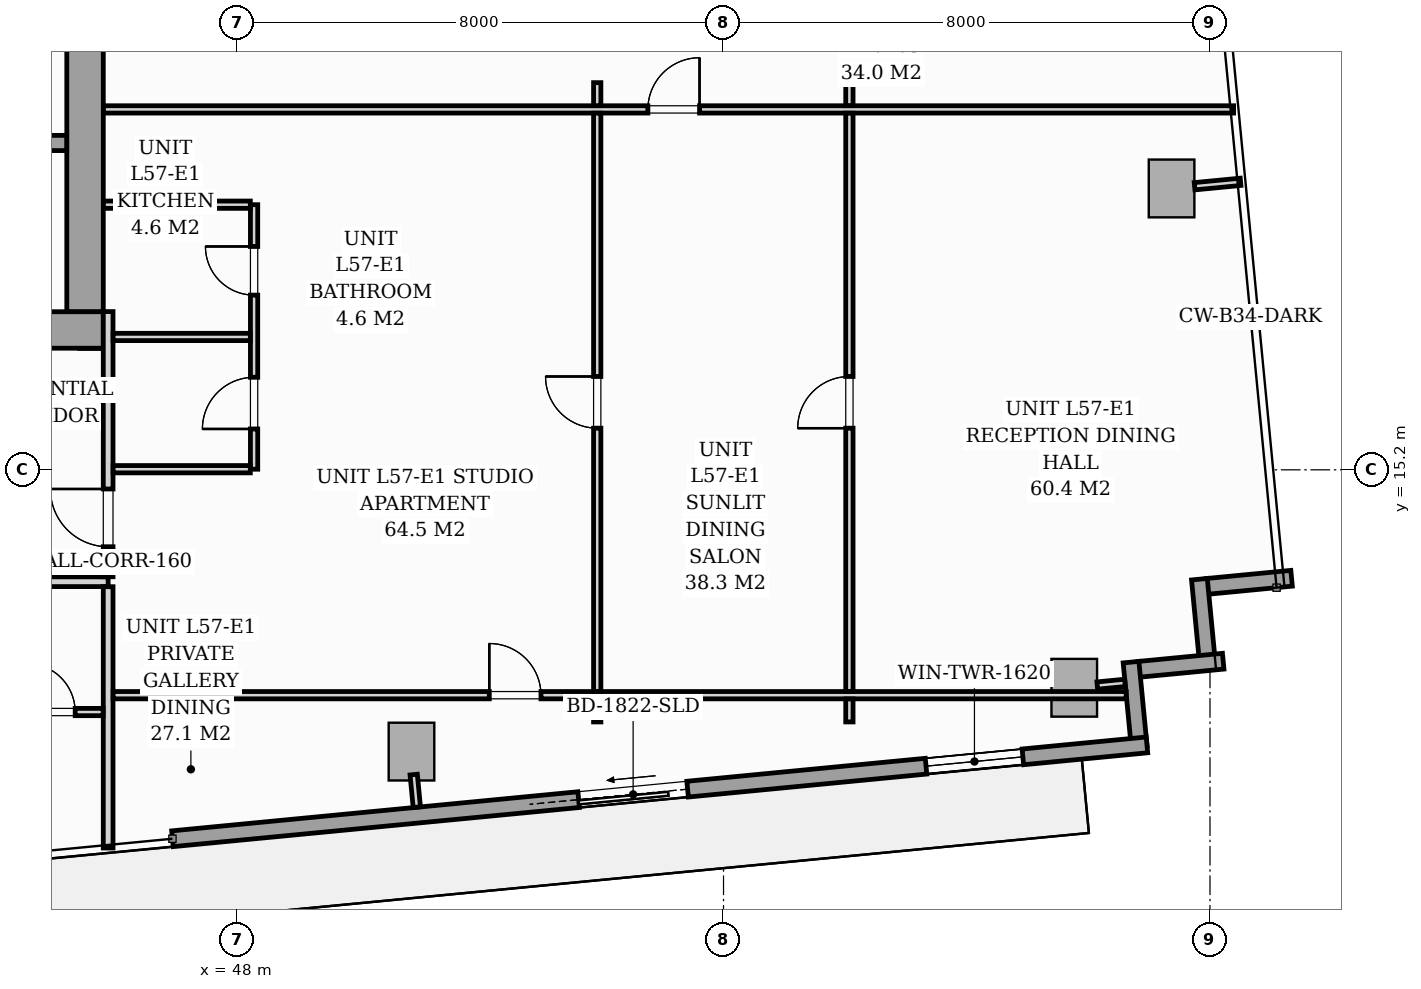
"""IFC4 building model, lengths in metres.
Left out: names, types, materials, properties, quantities, classifications, styles, units other than length and angle.
Written with IfcOpenShell. Run it as: python <this file> out.ifc"""

import sys

from ifc_helpers import new_model, si_unit, direction, frame, frame_2d, origin, origin_2d, place, context, subcontext, project, spatial, rectangle, i_section, extrude, source, transform, mapped, element, fill, save


model = new_model("IFC4")
c1 = context("Model", 3, precision=1e-05, world=origin(), true_north=direction((0.0, 1.0)))
c2 = subcontext(c1, "Body", "Model", "MODEL_VIEW")
j1 = project(units=[si_unit("LENGTHUNIT", "METRE"), si_unit("PLANEANGLEUNIT", "RADIAN")], contexts=[c1])
p1 = place(None, origin())
s1 = spatial("IfcSite", under=j1, at=p1, CompositionType="ELEMENT")
p2 = place(p1, origin())
s2 = spatial("IfcBuilding", under=s1, at=p2, CompositionType="ELEMENT")
p3 = place(p2, frame((0.0, 0.0, 198.6)))
s3 = spatial("IfcBuildingStorey", under=s2, at=p3, CompositionType="ELEMENT", Elevation=198.6)
m1 = source(origin(), c2, "Body", "SweptSolid", [
    extrude(i_section(OverallWidth=0.416, OverallDepth=0.446, WebThickness=0.039, FlangeThickness=0.063, FilletRadius=0.018, at=origin_2d()), origin(), (0.0, 0.0, 1.0), 3.196),
])
p4 = place(p3, frame((45.6, 17.4, 0.002), z_axis=(0.0, 0.0, 1.0), x_axis=(1.0, 0.0, 0.0)))
e1 = element("IfcColumn", 1, at=p4, inside=s3, PredefinedType="PILASTER", context=c2, shape_type="MappedRepresentation", body=[
    mapped(m1, transform((0.0, 0.0, 0.0), scale=1.0)),
])
m2 = source(origin(), c2, "Body", "SweptSolid", [
    extrude(rectangle(XDim=0.75, YDim=0.95, at=origin_2d()), origin(), (0.0, 0.0, 1.0), 3.196),
])
for number, where, z_axis, x_axis in (
    (2, (50.868, 10.566, 0.002), (0.0, 0.0, 1.0), (0.995, 0.096, 0.0)),
    (3, (61.768, 11.616, 0.002), (0.0, 0.0, 1.0), (0.995, 0.096, 0.0)),
    (4, (63.368, 19.827, 0.002), (0.0, 0.0, 1.0), (0.995, 0.096, 0.0)),
):
    element("IfcColumn", number, at=place(p3, frame(where, z_axis=z_axis, x_axis=x_axis)), inside=s3, PredefinedType="COLUMN", context=c2, shape_type="MappedRepresentation", body=[
        mapped(m2, transform((0.0, 0.0, 0.0), scale=1.0)),
    ])
p5 = place(p3, frame((65.342, 13.417, 0.0), z_axis=(0.0, 0.0, 1.0), x_axis=(-0.99540774648, -0.095725744959, 0.0)))
e5 = element("IfcWall", 5, at=p5, inside=s3, PredefinedType="STANDARD", context=c2, shape_type="SweptSolid", body=[
    extrude(rectangle(XDim=1.395, YDim=0.26, at=frame_2d((0.698, 0.0))), origin(), (0.0, 0.0, 1.0), 2.94),
])
p6 = place(p3, frame((63.826, 13.401, 0.0), z_axis=(0.0, 0.0, 1.0), x_axis=(0.095915846097, -0.995389446633, 0.0)))
e6 = element("IfcWall", 6, at=p6, inside=s3, PredefinedType="STANDARD", context=c2, shape_type="SweptSolid", body=[
    extrude(rectangle(XDim=1.395, YDim=0.26, at=frame_2d((0.697, 0.0))), origin(), (0.0, 0.0, 1.0), 2.94),
])
for number, where, z_axis, x_axis in (
    (7, (64.217, 12.053, 0.0), (0.0, 0.0, 1.0), (-0.995, -0.096, 0.0)),
    (8, (62.702, 12.037, 0.0), (0.0, 0.0, 1.0), (0.096, -0.995, 0.0)),
):
    element("IfcWall", number, at=place(p3, frame(where, z_axis=z_axis, x_axis=x_axis)), inside=s3, PredefinedType="STANDARD", context=c2, shape_type="SweptSolid", body=[
        extrude(rectangle(XDim=1.395, YDim=0.26, at=frame_2d((0.698, 0.0))), origin(), (0.0, 0.0, 1.0), 2.94),
    ])
p7 = place(p3, frame((62.963, 10.676, 0.0), z_axis=(0.0, 0.0, 1.0), x_axis=(-0.995395627913, -0.095851676732, 0.0)))
e9 = element("IfcWall", 9, at=p7, inside=s3, PredefinedType="STANDARD", context=c2, shape_type="SweptSolid", body=[
    extrude(rectangle(XDim=16.1, YDim=0.26, at=frame_2d((8.05, 0.0))), origin(), (0.0, 0.0, 1.0), 2.94),
])
p8 = place(p7, frame((7.589, 0.0, 0.0)))
e10 = element("IfcOpeningElement", 10, at=p8, cuts=e9, PredefinedType="OPENING", context=c2, shape_type="SweptSolid", body=[
    extrude(rectangle(XDim=1.8, YDim=2.06, at=frame_2d((0.9, 1.03))), frame((0.0, 0.14, 0.0), z_axis=(0.0, -1.0, 0.0), x_axis=(1.0, 0.0, 0.0)), (0.0, 0.0, 1.0), 0.28),
])
p9 = place(p7, frame((2.05, 0.0, 0.65)))
e11 = element("IfcOpeningElement", 11, at=p9, cuts=e9, PredefinedType="OPENING", context=c2, shape_type="SweptSolid", body=[
    extrude(rectangle(XDim=1.6, YDim=1.5, at=frame_2d((0.8, 0.75))), frame((0.0, 0.14, 0.0), z_axis=(0.0, -1.0, 0.0), x_axis=(1.0, 0.0, 0.0)), (0.0, 0.0, 1.0), 0.28),
])
p10 = place(p3, frame((26.2, 17.5, 0.0), z_axis=(0.0, 0.0, 1.0), x_axis=(1.0, 0.0, 0.0)))
e12 = element("IfcWall", 12, at=p10, inside=s3, PredefinedType="SHEAR", context=c2, shape_type="SweptSolid", body=[
    extrude(rectangle(XDim=19.6, YDim=0.6, at=frame_2d((9.8, 0.0))), origin(), (0.0, 0.0, 1.0), 3.2),
])
p11 = place(p10, frame((0.95, 0.0, 0.0)))
e13 = element("IfcOpeningElement", 13, at=p11, cuts=e12, PredefinedType="OPENING", context=c2, shape_type="SweptSolid", body=[
    extrude(rectangle(XDim=0.95, YDim=2.06, at=frame_2d((0.475, 1.03))), frame((0.0, 0.31, 0.0), z_axis=(0.0, -1.0, 0.0), x_axis=(1.0, 0.0, 0.0)), (0.0, 0.0, 1.0), 0.62),
])
p12 = place(p10, frame((9.38, 0.0, 0.0)))
e14 = element("IfcOpeningElement", 14, at=p12, cuts=e12, PredefinedType="OPENING", context=c2, shape_type="SweptSolid", body=[
    extrude(rectangle(XDim=0.85, YDim=2.0, at=frame_2d((0.425, 1.0))), frame((0.0, 0.31, 0.0), z_axis=(0.0, -1.0, 0.0), x_axis=(1.0, 0.0, 0.0)), (0.0, 0.0, 1.0), 0.62),
])
p13 = place(p10, frame((17.55, 0.0, 0.0)))
e15 = element("IfcOpeningElement", 15, at=p13, cuts=e12, PredefinedType="OPENING", context=c2, shape_type="SweptSolid", body=[
    extrude(rectangle(XDim=0.95, YDim=2.06, at=frame_2d((0.475, 1.03))), frame((0.0, 0.31, 0.0), z_axis=(0.0, -1.0, 0.0), x_axis=(1.0, 0.0, 0.0)), (0.0, 0.0, 1.0), 0.62),
])
p14 = place(p3, frame((45.5, 17.802, 0.0), z_axis=(0.0, 0.0, 1.0), x_axis=(0.0, 1.0, 0.0)))
e16 = element("IfcWall", 16, at=p14, inside=s3, PredefinedType="SHEAR", context=c2, shape_type="SweptSolid", body=[
    extrude(rectangle(XDim=5.796, YDim=0.6, at=frame_2d((2.898, 0.0))), origin(), (0.0, 0.0, 1.0), 3.2),
])
p15 = place(p3, frame((37.05, 20.575, 0.0), z_axis=(0.0, 0.0, 1.0), x_axis=(1.0, 0.0, 0.0)))
e17 = element("IfcWall", 17, at=p15, inside=s3, PredefinedType="SOLIDWALL", context=c2, shape_type="SweptSolid", body=[
    extrude(rectangle(XDim=8.148, YDim=0.25, at=frame_2d((4.074, 0.0))), origin(), (0.0, 0.0, 1.0), 3.2),
])
p16 = place(p15, frame((6.6, 0.0, 0.0)))
e18 = element("IfcOpeningElement", 18, at=p16, cuts=e17, PredefinedType="OPENING", context=c2, shape_type="SweptSolid", body=[
    extrude(rectangle(XDim=0.95, YDim=2.06, at=frame_2d((0.475, 1.03))), frame((0.0, 0.135, 0.0), z_axis=(0.0, -1.0, 0.0), x_axis=(1.0, 0.0, 0.0)), (0.0, 0.0, 1.0), 0.27),
])
p17 = place(p3, frame((26.12, 13.36, 0.0), z_axis=(0.0, 0.0, 1.0), x_axis=(1.0, 0.0, 0.0)))
e19 = element("IfcWall", 19, at=p17, inside=s3, PredefinedType="PARTITIONING", context=c2, shape_type="SweptSolid", body=[
    extrude(rectangle(XDim=19.76, YDim=0.16, at=frame_2d((9.88, 0.0))), origin(), (0.0, 0.0, 1.0), 2.94),
])
p18 = place(p17, frame((5.221, 0.0, 0.0)))
e20 = element("IfcOpeningElement", 20, at=p18, cuts=e19, PredefinedType="OPENING", context=c2, shape_type="SweptSolid", body=[
    extrude(rectangle(XDim=0.95, YDim=2.06, at=frame_2d((0.475, 1.03))), frame((0.0, 0.09, 0.0), z_axis=(0.0, -1.0, 0.0), x_axis=(1.0, 0.0, 0.0)), (0.0, 0.0, 1.0), 0.18),
])
p19 = place(p17, frame((12.119, 0.0, 0.0)))
e21 = element("IfcOpeningElement", 21, at=p19, cuts=e19, PredefinedType="OPENING", context=c2, shape_type="SweptSolid", body=[
    extrude(rectangle(XDim=0.95, YDim=2.06, at=frame_2d((0.475, 1.03))), frame((0.0, 0.09, 0.0), z_axis=(0.0, -1.0, 0.0), x_axis=(1.0, 0.0, 0.0)), (0.0, 0.0, 1.0), 0.18),
])
p20 = place(p17, frame((14.492, 0.0, 0.0)))
e22 = element("IfcOpeningElement", 22, at=p20, cuts=e19, PredefinedType="OPENING", context=c2, shape_type="SweptSolid", body=[
    extrude(rectangle(XDim=0.95, YDim=2.06, at=frame_2d((0.475, 1.03))), frame((0.0, 0.09, 0.0), z_axis=(0.0, -1.0, 0.0), x_axis=(1.0, 0.0, 0.0)), (0.0, 0.0, 1.0), 0.18),
])
p21 = place(p3, frame((45.88, 8.981, 0.0), z_axis=(0.0, 0.0, 1.0), x_axis=(0.0, 1.0, 0.0)))
e23 = element("IfcWall", 23, at=p21, inside=s3, PredefinedType="PARTITIONING", context=c2, shape_type="SweptSolid", body=[
    extrude(rectangle(XDim=4.297, YDim=0.16, at=frame_2d((2.148, 0.0))), origin(), (0.0, 0.0, 1.0), 2.94),
])
p22 = place(p3, frame((45.88, 13.442, 0.0), z_axis=(0.0, 0.0, 1.0), x_axis=(0.0, 1.0, 0.0)))
e24 = element("IfcWall", 24, at=p22, inside=s3, PredefinedType="PARTITIONING", context=c2, shape_type="SweptSolid", body=[
    extrude(rectangle(XDim=4.36, YDim=0.16, at=frame_2d((2.18, 0.0))), origin(), (0.0, 0.0, 1.0), 2.94),
])
p23 = place(p22, frame((0.493, 0.0, 0.0)))
e25 = element("IfcOpeningElement", 25, at=p23, cuts=e24, PredefinedType="OPENING", context=c2, shape_type="SweptSolid", body=[
    extrude(rectangle(XDim=0.95, YDim=2.06, at=frame_2d((0.475, 1.03))), frame((0.0, 0.09, 0.0), z_axis=(0.0, -1.0, 0.0), x_axis=(1.0, 0.0, 0.0)), (0.0, 0.0, 1.0), 0.18),
])
p24 = place(p3, frame((42.122, 11.217, 0.0), z_axis=(0.0, 0.0, 1.0), x_axis=(1.0, 0.0, 0.0)))
e26 = element("IfcWall", 26, at=p24, inside=s3, PredefinedType="PARTITIONING", context=c2, shape_type="SweptSolid", body=[
    extrude(rectangle(XDim=3.676, YDim=0.12, at=frame_2d((1.838, 0.0))), origin(), (0.0, 0.0, 1.0), 2.94),
])
p25 = place(p24, frame((0.552, 0.0, 0.0)))
e27 = element("IfcOpeningElement", 27, at=p25, cuts=e26, PredefinedType="OPENING", context=c2, shape_type="SweptSolid", body=[
    extrude(rectangle(XDim=0.85, YDim=2.05, at=frame_2d((0.425, 1.025))), frame((0.0, 0.07, 0.0), z_axis=(0.0, -1.0, 0.0), x_axis=(1.0, 0.0, 0.0)), (0.0, 0.0, 1.0), 0.14),
])
p26 = place(p24, frame((2.416, 0.0, 0.0)))
e28 = element("IfcOpeningElement", 28, at=p26, cuts=e26, PredefinedType="OPENING", context=c2, shape_type="SweptSolid", body=[
    extrude(rectangle(XDim=0.8, YDim=2.02, at=frame_2d((0.4, 1.01))), frame((0.0, 0.07, 0.0), z_axis=(0.0, -1.0, 0.0), x_axis=(1.0, 0.0, 0.0)), (0.0, 0.0, 1.0), 0.14),
])
p27 = place(p3, frame((48.28, 15.21, 0.0), z_axis=(0.0, 0.0, 1.0), x_axis=(0.0, 1.0, 0.0)))
e29 = element("IfcWall", 29, at=p27, inside=s3, PredefinedType="PARTITIONING", context=c2, shape_type="SweptSolid", body=[
    extrude(rectangle(XDim=4.35, YDim=0.12, at=frame_2d((2.175, 0.0))), origin(), (0.0, 0.0, 1.0), 2.94),
])
p28 = place(p27, frame((0.662, 0.0, 0.0)))
e30 = element("IfcOpeningElement", 30, at=p28, cuts=e29, PredefinedType="OPENING", context=c2, shape_type="SweptSolid", body=[
    extrude(rectangle(XDim=0.85, YDim=2.05, at=frame_2d((0.425, 1.025))), frame((0.0, 0.07, 0.0), z_axis=(0.0, -1.0, 0.0), x_axis=(1.0, 0.0, 0.0)), (0.0, 0.0, 1.0), 0.14),
])
p29 = place(p27, frame((2.863, 0.0, 0.0)))
e31 = element("IfcOpeningElement", 31, at=p29, cuts=e29, PredefinedType="OPENING", context=c2, shape_type="SweptSolid", body=[
    extrude(rectangle(XDim=0.8, YDim=2.02, at=frame_2d((0.4, 1.01))), frame((0.0, 0.07, 0.0), z_axis=(0.0, -1.0, 0.0), x_axis=(1.0, 0.0, 0.0)), (0.0, 0.0, 1.0), 0.14),
])
p30 = place(p3, frame((45.962, 17.385, 0.0), z_axis=(0.0, 0.0, 1.0), x_axis=(1.0, 0.0, 0.0)))
e32 = element("IfcWall", 32, at=p30, inside=s3, PredefinedType="PARTITIONING", context=c2, shape_type="SweptSolid", body=[
    extrude(rectangle(XDim=2.256, YDim=0.12, at=frame_2d((1.128, 0.0))), origin(), (0.0, 0.0, 1.0), 2.281),
])
p31 = place(p3, frame((45.962, 15.21, 0.0), z_axis=(0.0, 0.0, 1.0), x_axis=(1.0, 0.0, 0.0)))
e33 = element("IfcWall", 33, at=p31, inside=s3, PredefinedType="PARTITIONING", context=c2, shape_type="SweptSolid", body=[
    extrude(rectangle(XDim=2.256, YDim=0.12, at=frame_2d((1.128, 0.0))), origin(), (0.0, 0.0, 1.0), 2.94),
])
p32 = place(p3, frame((45.802, 19.56, 0.0), z_axis=(0.0, 0.0, 1.0), x_axis=(1.0, 0.0, 0.0)))
e34 = element("IfcWall", 34, at=p32, inside=s3, PredefinedType="PARTITIONING", context=c2, shape_type="SweptSolid", body=[
    extrude(rectangle(XDim=2.416, YDim=0.12, at=frame_2d((1.208, 0.0))), origin(), (0.0, 0.0, 1.0), 2.94),
])
p33 = place(p3, frame((45.962, 11.494, 0.0), z_axis=(0.0, 0.0, 1.0), x_axis=(1.0, 0.0, 0.0)))
e35 = element("IfcWall", 35, at=p33, inside=s3, PredefinedType="PARTITIONING", context=c2, shape_type="SweptSolid", body=[
    extrude(rectangle(XDim=16.66, YDim=0.12, at=frame_2d((8.33, 0.0))), origin(), (0.0, 0.0, 1.0), 2.382),
])
p34 = place(p33, frame((6.186, 0.0, 0.0)))
e36 = element("IfcOpeningElement", 36, at=p34, cuts=e35, PredefinedType="OPENING", context=c2, shape_type="SweptSolid", body=[
    extrude(rectangle(XDim=0.85, YDim=2.05, at=frame_2d((0.425, 1.025))), frame((0.0, 0.07, 0.0), z_axis=(0.0, -1.0, 0.0), x_axis=(1.0, 0.0, 0.0)), (0.0, 0.0, 1.0), 0.14),
])
p35 = place(p3, frame((45.802, 21.127, 0.0), z_axis=(0.0, 0.0, 1.0), x_axis=(1.0, 0.0, 0.0)))
e37 = element("IfcWall", 37, at=p35, inside=s3, PredefinedType="PARTITIONING", context=c2, shape_type="SweptSolid", body=[
    extrude(rectangle(XDim=18.586, YDim=0.12, at=frame_2d((9.293, 0.0))), origin(), (0.0, 0.0, 1.0), 2.94),
])
p36 = place(p35, frame((8.954, 0.0, 0.0)))
e38 = element("IfcOpeningElement", 38, at=p36, cuts=e37, PredefinedType="OPENING", context=c2, shape_type="SweptSolid", body=[
    extrude(rectangle(XDim=0.85, YDim=2.05, at=frame_2d((0.425, 1.025))), frame((0.0, 0.07, 0.0), z_axis=(0.0, -1.0, 0.0), x_axis=(1.0, 0.0, 0.0)), (0.0, 0.0, 1.0), 0.14),
])
p37 = place(p3, frame((58.07, 11.054, 0.0), z_axis=(0.0, 0.0, 1.0), x_axis=(0.0, 1.0, 0.0)))
e39 = element("IfcWall", 39, at=p37, inside=s3, PredefinedType="PARTITIONING", context=c2, shape_type="SweptSolid", body=[
    extrude(rectangle(XDim=0.378, YDim=0.12, at=frame_2d((0.189, 0.0))), origin(), (0.0, 0.0, 1.0), 2.94),
])
p38 = place(p3, frame((58.07, 11.556, 0.0), z_axis=(0.0, 0.0, 1.0), x_axis=(0.0, 1.0, 0.0)))
e40 = element("IfcWall", 40, at=p38, inside=s3, PredefinedType="PARTITIONING", context=c2, shape_type="SweptSolid", body=[
    extrude(rectangle(XDim=9.509, YDim=0.12, at=frame_2d((4.754, 0.0))), origin(), (0.0, 0.0, 1.0), 2.94),
])
p39 = place(p38, frame((4.329, 0.0, 0.0)))
e41 = element("IfcOpeningElement", 41, at=p39, cuts=e40, PredefinedType="OPENING", context=c2, shape_type="SweptSolid", body=[
    extrude(rectangle(XDim=0.85, YDim=2.05, at=frame_2d((0.425, 1.025))), frame((0.0, 0.07, 0.0), z_axis=(0.0, -1.0, 0.0), x_axis=(1.0, 0.0, 0.0)), (0.0, 0.0, 1.0), 0.14),
])
for number, where, z_axis, x_axis in (
    (42, (58.07, 21.189, 0.0), (0.0, 0.0, 1.0), (0.0, 1.0, 0.0)),
    (43, (53.923, 11.054, 0.0), (0.0, 0.0, 1.0), (0.0, 1.0, 0.0)),
):
    element("IfcWall", number, at=place(p3, frame(where, z_axis=z_axis, x_axis=x_axis)), inside=s3, PredefinedType="PARTITIONING", context=c2, shape_type="SweptSolid", body=[
        extrude(rectangle(XDim=0.378, YDim=0.12, at=frame_2d((0.189, 0.0))), origin(), (0.0, 0.0, 1.0), 2.94),
    ])
p40 = place(p3, frame((53.923, 11.556, 0.0), z_axis=(0.0, 0.0, 1.0), x_axis=(0.0, 1.0, 0.0)))
e44 = element("IfcWall", 44, at=p40, inside=s3, PredefinedType="PARTITIONING", context=c2, shape_type="SweptSolid", body=[
    extrude(rectangle(XDim=9.509, YDim=0.12, at=frame_2d((4.754, 0.0))), origin(), (0.0, 0.0, 1.0), 2.94),
])
p41 = place(p40, frame((4.329, 0.0, 0.0)))
e45 = element("IfcOpeningElement", 45, at=p41, cuts=e44, PredefinedType="OPENING", context=c2, shape_type="SweptSolid", body=[
    extrude(rectangle(XDim=0.85, YDim=2.05, at=frame_2d((0.425, 1.025))), frame((0.0, 0.07, 0.0), z_axis=(0.0, -1.0, 0.0), x_axis=(1.0, 0.0, 0.0)), (0.0, 0.0, 1.0), 0.14),
])
p42 = place(p3, frame((53.923, 21.189, 0.0), z_axis=(0.0, 0.0, 1.0), x_axis=(0.0, 1.0, 0.0)))
e46 = element("IfcWall", 46, at=p42, inside=s3, PredefinedType="PARTITIONING", context=c2, shape_type="SweptSolid", body=[
    extrude(rectangle(XDim=0.378, YDim=0.12, at=frame_2d((0.189, 0.0))), origin(), (0.0, 0.0, 1.0), 2.94),
])
p43 = place(p3, frame((50.905, 10.188, 0.0), z_axis=(0.0, 0.0, 1.0), x_axis=(0.095772948675, -0.995403205893, 0.0)))
e47 = element("IfcWall", 47, at=p43, inside=s3, PredefinedType="PARTITIONING", context=c2, shape_type="SweptSolid", body=[
    extrude(rectangle(XDim=0.538, YDim=0.12, at=frame_2d((0.269, 0.0))), origin(), (0.0, 0.0, 1.0), 2.94),
])
p44 = place(p3, frame((62.146, 11.652, 0.0), z_axis=(0.0, 0.0, 1.0), x_axis=(0.995384576284, 0.09596637586, 0.0)))
e48 = element("IfcWall", 48, at=p44, inside=s3, PredefinedType="PARTITIONING", context=c2, shape_type="SweptSolid", body=[
    extrude(rectangle(XDim=0.458, YDim=0.12, at=frame_2d((0.229, 0.0))), origin(), (0.0, 0.0, 1.0), 2.94),
])
p45 = place(p3, frame((63.747, 19.864, 0.0), z_axis=(0.0, 0.0, 1.0), x_axis=(0.995405496295, 0.095749140702, 0.0)))
e49 = element("IfcWall", 49, at=p45, inside=s3, PredefinedType="PARTITIONING", context=c2, shape_type="SweptSolid", body=[
    extrude(rectangle(XDim=0.76, YDim=0.12, at=frame_2d((0.38, 0.0))), origin(), (0.0, 0.0, 1.0), 2.94),
])
m3 = source(origin(), c2, "Body", "SweptSolid", [
    extrude(rectangle(XDim=1.8, YDim=2.06, at=frame_2d((0.9, 1.03))), frame((0.0, 0.025, 0.0), z_axis=(0.0, -1.0, 0.0), x_axis=(1.0, 0.0, 0.0)), (0.0, 0.0, 1.0), 0.05),
])
p46 = place(p8, origin())
e50 = element("IfcDoor", 50, at=p46, inside=s3, OperationType="SLIDING_TO_RIGHT", PredefinedType="DOOR", context=c2, shape_type="MappedRepresentation", body=[
    mapped(m3, transform((0.0, 0.0, 0.0), scale=1.0)),
])
fill(e10, e50)
m4 = source(origin(), c2, "Body", "SweptSolid", [
    extrude(rectangle(XDim=1.6, YDim=1.5, at=frame_2d((0.8, 0.75))), frame((0.0, 0.03, 0.0), z_axis=(0.0, -1.0, 0.0), x_axis=(1.0, 0.0, 0.0)), (0.0, 0.0, 1.0), 0.06),
])
p47 = place(p9, origin())
e51 = element("IfcWindow", 51, at=p47, inside=s3, PartitioningType="SINGLE_PANEL", PredefinedType="WINDOW", context=c2, shape_type="MappedRepresentation", body=[
    mapped(m4, transform((0.0, 0.0, 0.0), scale=1.0)),
])
fill(e11, e51)
m5 = source(origin(), c2, "Body", "SweptSolid", [
    extrude(rectangle(XDim=0.8, YDim=2.02, at=frame_2d((0.4, 1.01))), frame((0.0, 0.025, 0.0), z_axis=(0.0, -1.0, 0.0), x_axis=(1.0, 0.0, 0.0)), (0.0, 0.0, 1.0), 0.05),
])
p48 = place(p26, origin())
e52 = element("IfcDoor", 52, at=p48, inside=s3, OperationType="SINGLE_SWING_LEFT", PredefinedType="DOOR", context=c2, shape_type="MappedRepresentation", body=[
    mapped(m5, transform((0.0, 0.0, 0.0), scale=1.0)),
])
fill(e28, e52)
m6 = source(origin(), c2, "Body", "SweptSolid", [
    extrude(rectangle(XDim=0.95, YDim=2.06, at=frame_2d((0.475, 1.03))), frame((0.0, 0.025, 0.0), z_axis=(0.0, -1.0, 0.0), x_axis=(1.0, 0.0, 0.0)), (0.0, 0.0, 1.0), 0.05),
])
p49 = place(p23, origin())
e53 = element("IfcDoor", 53, at=p49, inside=s3, OperationType="SINGLE_SWING_RIGHT", PredefinedType="DOOR", context=c2, shape_type="MappedRepresentation", body=[
    mapped(m6, transform((0.0, 0.0, 0.0), scale=1.0)),
])
fill(e25, e53)
m7 = source(origin(), c2, "Body", "SweptSolid", [
    extrude(rectangle(XDim=0.85, YDim=2.05, at=frame_2d((0.425, 1.025))), frame((0.0, 0.025, 0.0), z_axis=(0.0, -1.0, 0.0), x_axis=(1.0, 0.0, 0.0)), (0.0, 0.0, 1.0), 0.05),
])
p50 = place(p28, origin())
e54 = element("IfcDoor", 54, at=p50, inside=s3, OperationType="SINGLE_SWING_LEFT", PredefinedType="DOOR", context=c2, shape_type="MappedRepresentation", body=[
    mapped(m7, transform((0.0, 0.0, 0.0), scale=1.0)),
])
fill(e30, e54)
p51 = place(p29, origin())
e55 = element("IfcDoor", 55, at=p51, inside=s3, OperationType="SINGLE_SWING_RIGHT", PredefinedType="DOOR", context=c2, shape_type="MappedRepresentation", body=[
    mapped(m5, transform((0.0, 0.0, 0.0), scale=1.0)),
])
fill(e31, e55)
p52 = place(p34, origin())
e56 = element("IfcDoor", 56, at=p52, inside=s3, OperationType="SINGLE_SWING_LEFT", PredefinedType="DOOR", context=c2, shape_type="MappedRepresentation", body=[
    mapped(m7, transform((0.0, 0.0, 0.0), scale=1.0)),
])
fill(e36, e56)
p53 = place(p36, origin())
e57 = element("IfcDoor", 57, at=p53, inside=s3, OperationType="SINGLE_SWING_RIGHT", PredefinedType="DOOR", context=c2, shape_type="MappedRepresentation", body=[
    mapped(m7, transform((0.0, 0.0, 0.0), scale=1.0)),
])
fill(e38, e57)
p54 = place(p39, origin())
e58 = element("IfcDoor", 58, at=p54, inside=s3, OperationType="SINGLE_SWING_LEFT", PredefinedType="DOOR", context=c2, shape_type="MappedRepresentation", body=[
    mapped(m7, transform((0.0, 0.0, 0.0), scale=1.0)),
])
fill(e41, e58)
p55 = place(p41, origin())
e59 = element("IfcDoor", 59, at=p55, inside=s3, OperationType="SINGLE_SWING_RIGHT", PredefinedType="DOOR", context=c2, shape_type="MappedRepresentation", body=[
    mapped(m7, transform((0.0, 0.0, 0.0), scale=1.0)),
])
fill(e45, e59)
save(model, sys.argv[1])
